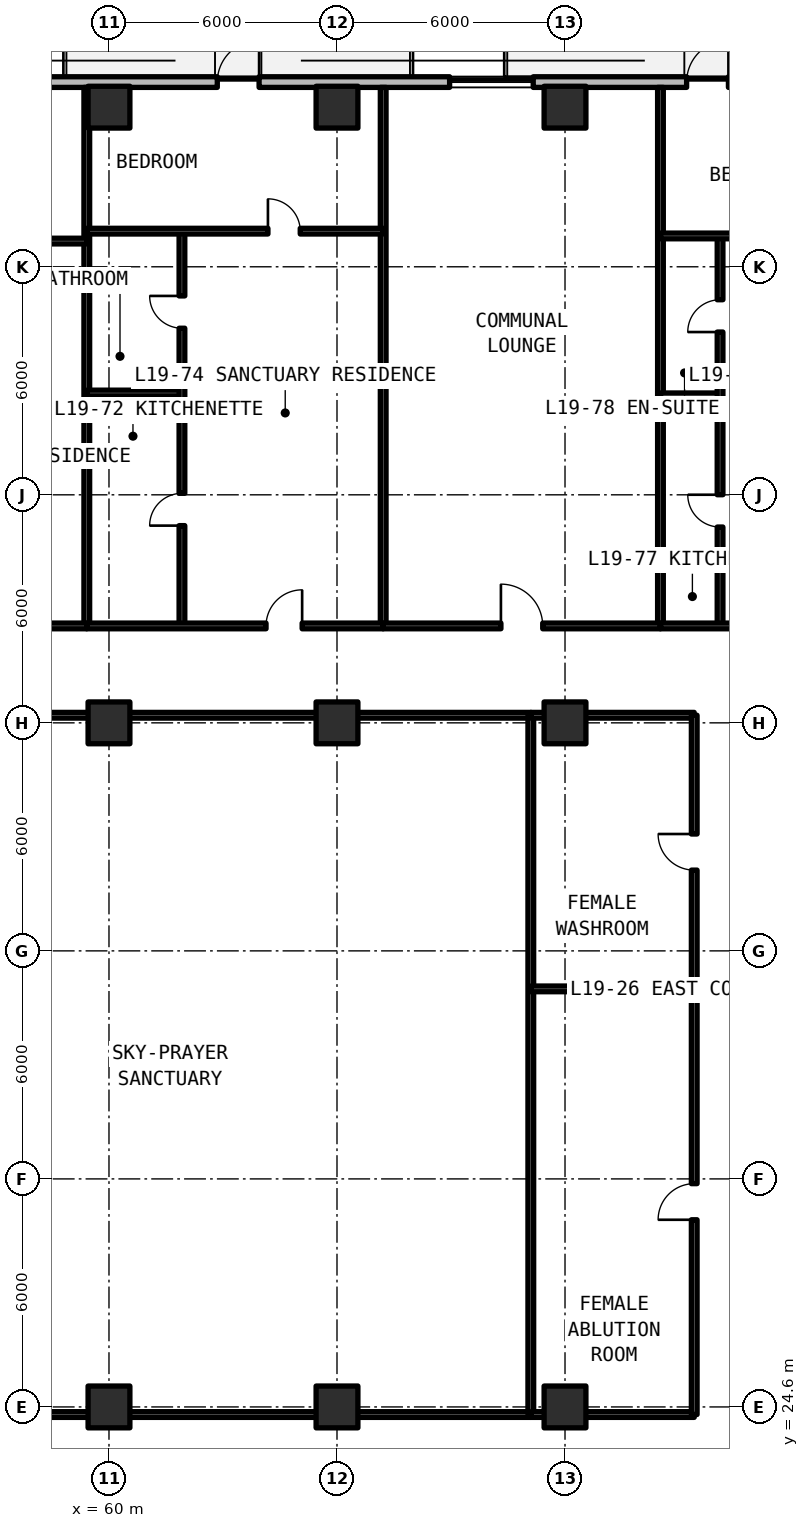
"""IFC4 building model, lengths in metres.
Left out: names, types, materials, properties, quantities, classifications, styles, units other than length and angle.
Written with IfcOpenShell. Run it as: python <this file> out.ifc"""

import sys

from ifc_helpers import new_model, si_unit, direction, frame, frame_2d, origin, origin_2d, place, context, subcontext, project, spatial, rectangle, extrude, element, fill, save


model = new_model("IFC4")
c1 = context("Model", 3, precision=1e-05, world=origin(), true_north=direction((0.0, 1.0)))
c2 = subcontext(c1, "Body", "Model", "MODEL_VIEW")
j1 = project(units=[si_unit("LENGTHUNIT", "METRE"), si_unit("PLANEANGLEUNIT", "RADIAN")], contexts=[c1])
p1 = place(None, origin())
s1 = spatial("IfcSite", under=j1, at=p1, CompositionType="ELEMENT")
p2 = place(p1, origin())
s2 = spatial("IfcBuilding", under=s1, at=p2, CompositionType="ELEMENT")
p3 = place(p2, frame((0.0, 0.0, 69.63)))
s3 = spatial("IfcBuildingStorey", under=s2, at=p3, CompositionType="ELEMENT", Elevation=69.63)
for number, where, z_axis, x_axis in (
    (1, (60.0, 24.6, 0.0), (0.0, 0.0, 1.0), (1.0, 0.0, 0.0)),
    (2, (60.0, 42.6, 0.0), (0.0, 0.0, 1.0), (1.0, 0.0, 0.0)),
    (3, (66.0, 24.6, 0.0), (0.0, 0.0, 1.0), (1.0, 0.0, 0.0)),
    (4, (66.0, 42.6, 0.0), (0.0, 0.0, 1.0), (1.0, 0.0, 0.0)),
    (5, (72.0, 24.6, 0.0), (0.0, 0.0, 1.0), (1.0, 0.0, 0.0)),
    (6, (72.0, 42.6, 0.0), (0.0, 0.0, 1.0), (1.0, 0.0, 0.0)),
    (7, (60.0, 58.8, 0.0), (0.0, 0.0, 1.0), (1.0, 0.0, 0.0)),
    (8, (66.0, 58.8, 0.0), (0.0, 0.0, 1.0), (1.0, 0.0, 0.0)),
    (9, (72.0, 58.8, 0.0), (0.0, 0.0, 1.0), (1.0, 0.0, 0.0)),
):
    element("IfcColumn", number, at=place(p3, frame(where, z_axis=z_axis, x_axis=x_axis)), inside=s3, PredefinedType="COLUMN", context=c2, shape_type="SweptSolid", body=[
        extrude(rectangle(XDim=1.1, YDim=1.1, at=origin_2d()), origin(), (0.0, 0.0, 1.0), 3.63),
    ])
p4 = place(p3, frame((96.542, 59.46, 0.0), z_axis=(0.0, 0.0, 1.0), x_axis=(-1.0, 0.0, 0.0)))
e10 = element("IfcWall", 10, at=p4, inside=s3, PredefinedType="SOLIDWALL", context=c2, shape_type="SweptSolid", body=[
    extrude(rectangle(XDim=44.402, YDim=0.28, at=frame_2d((22.201, 0.0))), origin(), (0.0, 0.0, 1.0), 3.35),
])
p5 = place(p4, frame((32.592, 0.0, 0.0)))
e11 = element("IfcOpeningElement", 11, at=p5, cuts=e10, PredefinedType="OPENING", context=c2, shape_type="SweptSolid", body=[
    extrude(rectangle(XDim=1.1, YDim=2.15, at=frame_2d((0.55, 1.075))), frame((0.0, 0.15, 0.0), z_axis=(0.0, -1.0, 0.0), x_axis=(1.0, 0.0, 0.0)), (0.0, 0.0, 1.0), 0.3),
])
p6 = place(p4, frame((20.242, 0.0, 0.0)))
e12 = element("IfcOpeningElement", 12, at=p6, cuts=e10, PredefinedType="OPENING", context=c2, shape_type="SweptSolid", body=[
    extrude(rectangle(XDim=1.1, YDim=2.15, at=frame_2d((0.55, 1.075))), frame((0.0, 0.15, 0.0), z_axis=(0.0, -1.0, 0.0), x_axis=(1.0, 0.0, 0.0)), (0.0, 0.0, 1.0), 0.3),
])
p7 = place(p4, frame((9.392, 0.0, 0.0)))
e13 = element("IfcOpeningElement", 13, at=p7, cuts=e10, PredefinedType="OPENING", context=c2, shape_type="SweptSolid", body=[
    extrude(rectangle(XDim=1.1, YDim=2.15, at=frame_2d((0.55, 1.075))), frame((0.0, 0.15, 0.0), z_axis=(0.0, -1.0, 0.0), x_axis=(1.0, 0.0, 0.0)), (0.0, 0.0, 1.0), 0.3),
])
p8 = place(p4, frame((39.514, 0.0, 0.78)))
e14 = element("IfcOpeningElement", 14, at=p8, cuts=e10, PredefinedType="OPENING", context=c2, shape_type="SweptSolid", body=[
    extrude(rectangle(XDim=2.2, YDim=1.66, at=frame_2d((1.1, 0.83))), frame((0.0, 0.15, 0.0), z_axis=(0.0, -1.0, 0.0), x_axis=(1.0, 0.0, 0.0)), (0.0, 0.0, 1.0), 0.3),
])
p9 = place(p4, frame((25.379, 0.0, 0.78)))
e15 = element("IfcOpeningElement", 15, at=p9, cuts=e10, PredefinedType="OPENING", context=c2, shape_type="SweptSolid", body=[
    extrude(rectangle(XDim=2.2, YDim=1.66, at=frame_2d((1.1, 0.83))), frame((0.0, 0.15, 0.0), z_axis=(0.0, -1.0, 0.0), x_axis=(1.0, 0.0, 0.0)), (0.0, 0.0, 1.0), 0.3),
])
p10 = place(p4, frame((2.564, 0.0, 0.78)))
e16 = element("IfcOpeningElement", 16, at=p10, cuts=e10, PredefinedType="OPENING", context=c2, shape_type="SweptSolid", body=[
    extrude(rectangle(XDim=2.2, YDim=1.66, at=frame_2d((1.1, 0.83))), frame((0.0, 0.15, 0.0), z_axis=(0.0, -1.0, 0.0), x_axis=(1.0, 0.0, 0.0)), (0.0, 0.0, 1.0), 0.3),
])
p11 = place(p3, frame((42.1, 24.4, 0.0), z_axis=(0.0, 0.0, 1.0), x_axis=(1.0, 0.0, 0.0)))
e17 = element("IfcWall", 17, at=p11, inside=s3, PredefinedType="SOLIDWALL", context=c2, shape_type="SweptSolid", body=[
    extrude(rectangle(XDim=29.0, YDim=0.15, at=frame_2d((14.5, 0.0))), origin(), (0.0, 0.0, 1.0), 2.565),
])
p12 = place(p11, frame((13.8, 0.0, 0.0)))
e18 = element("IfcOpeningElement", 18, at=p12, cuts=e17, PredefinedType="OPENING", context=c2, shape_type="SweptSolid", body=[
    extrude(rectangle(XDim=1.4, YDim=2.15, at=frame_2d((0.7, 1.075))), frame((0.0, 0.085, 0.0), z_axis=(0.0, -1.0, 0.0), x_axis=(1.0, 0.0, 0.0)), (0.0, 0.0, 1.0), 0.17),
])
p13 = place(p3, frame((42.1, 42.8, 0.0), z_axis=(0.0, 0.0, 1.0), x_axis=(1.0, 0.0, 0.0)))
e19 = element("IfcWall", 19, at=p13, inside=s3, PredefinedType="SOLIDWALL", context=c2, shape_type="SweptSolid", body=[
    extrude(rectangle(XDim=29.0, YDim=0.15, at=frame_2d((14.5, 0.0))), origin(), (0.0, 0.0, 1.0), 2.565),
])
p14 = place(p3, frame((71.1, 24.4, 0.0), z_axis=(0.0, 0.0, 1.0), x_axis=(0.0, 1.0, 0.0)))
e20 = element("IfcWall", 20, at=p14, inside=s3, PredefinedType="SOLIDWALL", context=c2, shape_type="SweptSolid", body=[
    extrude(rectangle(XDim=18.4, YDim=0.15, at=frame_2d((9.2, 0.0))), origin(), (0.0, 0.0, 1.0), 2.57),
])
p15 = place(p3, frame((71.1, 24.4, 0.0), z_axis=(0.0, 0.0, 1.0), x_axis=(1.0, 0.0, 0.0)))
e21 = element("IfcWall", 21, at=p15, inside=s3, PredefinedType="SOLIDWALL", context=c2, shape_type="SweptSolid", body=[
    extrude(rectangle(XDim=4.3, YDim=0.15, at=frame_2d((2.15, 0.0))), origin(), (0.0, 0.0, 1.0), 2.565),
])
p16 = place(p3, frame((71.1, 35.6, 0.0), z_axis=(0.0, 0.0, 1.0), x_axis=(1.0, 0.0, 0.0)))
e22 = element("IfcWall", 22, at=p16, inside=s3, PredefinedType="SOLIDWALL", context=c2, shape_type="SweptSolid", body=[
    extrude(rectangle(XDim=4.3, YDim=0.15, at=frame_2d((2.15, 0.0))), origin(), (0.0, 0.0, 1.0), 2.57),
])
p17 = place(p3, frame((75.4, 24.4, 0.0), z_axis=(0.0, 0.0, 1.0), x_axis=(0.0, 1.0, 0.0)))
e23 = element("IfcWall", 23, at=p17, inside=s3, PredefinedType="SOLIDWALL", context=c2, shape_type="SweptSolid", body=[
    extrude(rectangle(XDim=11.2, YDim=0.15, at=frame_2d((5.6, 0.0))), origin(), (0.0, 0.0, 1.0), 2.57),
])
p18 = place(p17, frame((5.125, 0.0, 0.0)))
e24 = element("IfcOpeningElement", 24, at=p18, cuts=e23, PredefinedType="OPENING", context=c2, shape_type="SweptSolid", body=[
    extrude(rectangle(XDim=0.95, YDim=2.15, at=frame_2d((0.475, 1.075))), frame((0.0, 0.085, 0.0), z_axis=(0.0, -1.0, 0.0), x_axis=(1.0, 0.0, 0.0)), (0.0, 0.0, 1.0), 0.17),
])
p19 = place(p3, frame((71.1, 42.8, 0.0), z_axis=(0.0, 0.0, 1.0), x_axis=(1.0, 0.0, 0.0)))
e25 = element("IfcWall", 25, at=p19, inside=s3, PredefinedType="SOLIDWALL", context=c2, shape_type="SweptSolid", body=[
    extrude(rectangle(XDim=4.3, YDim=0.15, at=frame_2d((2.15, 0.0))), origin(), (0.0, 0.0, 1.0), 2.565),
])
p20 = place(p3, frame((75.4, 35.6, 0.0), z_axis=(0.0, 0.0, 1.0), x_axis=(0.0, 1.0, 0.0)))
e26 = element("IfcWall", 26, at=p20, inside=s3, PredefinedType="SOLIDWALL", context=c2, shape_type="SweptSolid", body=[
    extrude(rectangle(XDim=7.2, YDim=0.15, at=frame_2d((3.6, 0.0))), origin(), (0.0, 0.0, 1.0), 2.57),
])
p21 = place(p20, frame((3.125, 0.0, 0.0)))
e27 = element("IfcOpeningElement", 27, at=p21, cuts=e26, PredefinedType="OPENING", context=c2, shape_type="SweptSolid", body=[
    extrude(rectangle(XDim=0.95, YDim=2.15, at=frame_2d((0.475, 1.075))), frame((0.0, 0.085, 0.0), z_axis=(0.0, -1.0, 0.0), x_axis=(1.0, 0.0, 0.0)), (0.0, 0.0, 1.0), 0.17),
])
p22 = place(p3, frame((59.416, 45.15, 0.0), z_axis=(0.0, 0.0, 1.0), x_axis=(0.0, 1.0, 0.0)))
e28 = element("IfcWall", 28, at=p22, inside=s3, PredefinedType="SOLIDWALL", context=c2, shape_type="SweptSolid", body=[
    extrude(rectangle(XDim=14.17, YDim=0.15, at=frame_2d((7.085, 0.0))), origin(), (0.0, 0.0, 1.0), 2.57),
])
p23 = place(p3, frame((52.12, 55.277, 0.0), z_axis=(0.0, 0.0, 1.0), x_axis=(1.0, 0.0, 0.0)))
e29 = element("IfcWall", 29, at=p23, inside=s3, PredefinedType="PARTITIONING", context=c2, shape_type="SweptSolid", body=[
    extrude(rectangle(XDim=7.296, YDim=0.15, at=frame_2d((3.648, 0.0))), origin(), (0.0, 0.0, 1.0), 2.57),
])
p24 = place(p23, frame((5.163, 0.0, 0.0)))
e30 = element("IfcOpeningElement", 30, at=p24, cuts=e29, PredefinedType="OPENING", context=c2, shape_type="SweptSolid", body=[
    extrude(rectangle(XDim=0.85, YDim=2.1, at=frame_2d((0.425, 1.05))), frame((0.0, 0.085, 0.0), z_axis=(0.0, -1.0, 0.0), x_axis=(1.0, 0.0, 0.0)), (0.0, 0.0, 1.0), 0.17),
])
p25 = place(p3, frame((52.12, 45.15, 0.0), z_axis=(0.0, 0.0, 1.0), x_axis=(1.0, 0.0, 0.0)))
e31 = element("IfcWall", 31, at=p25, inside=s3, PredefinedType="SOLIDWALL", context=c2, shape_type="SweptSolid", body=[
    extrude(rectangle(XDim=7.296, YDim=0.15, at=frame_2d((3.648, 0.0))), origin(), (0.0, 0.0, 1.0), 2.57),
])
p26 = place(p25, frame((5.113, 0.0, 0.0)))
e32 = element("IfcOpeningElement", 32, at=p26, cuts=e31, PredefinedType="OPENING", context=c2, shape_type="SweptSolid", body=[
    extrude(rectangle(XDim=0.95, YDim=2.15, at=frame_2d((0.475, 1.075))), frame((0.0, 0.085, 0.0), z_axis=(0.0, -1.0, 0.0), x_axis=(1.0, 0.0, 0.0)), (0.0, 0.0, 1.0), 0.17),
])
p27 = place(p3, frame((67.215, 45.15, 0.0), z_axis=(0.0, 0.0, 1.0), x_axis=(0.0, 1.0, 0.0)))
e33 = element("IfcWall", 33, at=p27, inside=s3, PredefinedType="SOLIDWALL", context=c2, shape_type="SweptSolid", body=[
    extrude(rectangle(XDim=14.17, YDim=0.15, at=frame_2d((7.085, 0.0))), origin(), (0.0, 0.0, 1.0), 2.57),
])
p28 = place(p3, frame((59.416, 51.279, 0.0), z_axis=(0.0, 0.0, 1.0), x_axis=(1.0, 0.0, 0.0)))
e34 = element("IfcWall", 34, at=p28, inside=s3, PredefinedType="PARTITIONING", context=c2, shape_type="SweptSolid", body=[
    extrude(rectangle(XDim=2.504, YDim=0.15, at=frame_2d((1.252, 0.0))), origin(), (0.0, 0.0, 1.0), 2.57),
])
p29 = place(p3, frame((61.92, 45.15, 0.0), z_axis=(0.0, 0.0, 1.0), x_axis=(0.0, 1.0, 0.0)))
e35 = element("IfcWall", 35, at=p29, inside=s3, PredefinedType="PARTITIONING", context=c2, shape_type="SweptSolid", body=[
    extrude(rectangle(XDim=10.388, YDim=0.15, at=frame_2d((5.194, 0.0))), origin(), (0.0, 0.0, 1.0), 2.57),
])
p30 = place(p29, frame((2.639, 0.0, 0.0)))
e36 = element("IfcOpeningElement", 36, at=p30, cuts=e35, PredefinedType="OPENING", context=c2, shape_type="SweptSolid", body=[
    extrude(rectangle(XDim=0.85, YDim=2.1, at=frame_2d((0.425, 1.05))), frame((0.0, 0.085, 0.0), z_axis=(0.0, -1.0, 0.0), x_axis=(1.0, 0.0, 0.0)), (0.0, 0.0, 1.0), 0.17),
])
p31 = place(p29, frame((7.833, 0.0, 0.0)))
e37 = element("IfcOpeningElement", 37, at=p31, cuts=e35, PredefinedType="OPENING", context=c2, shape_type="SweptSolid", body=[
    extrude(rectangle(XDim=0.85, YDim=2.1, at=frame_2d((0.425, 1.05))), frame((0.0, 0.085, 0.0), z_axis=(0.0, -1.0, 0.0), x_axis=(1.0, 0.0, 0.0)), (0.0, 0.0, 1.0), 0.17),
])
p32 = place(p3, frame((59.416, 55.538, 0.0), z_axis=(0.0, 0.0, 1.0), x_axis=(1.0, 0.0, 0.0)))
e38 = element("IfcWall", 38, at=p32, inside=s3, PredefinedType="PARTITIONING", context=c2, shape_type="SweptSolid", body=[
    extrude(rectangle(XDim=7.799, YDim=0.15, at=frame_2d((3.9, 0.0))), origin(), (0.0, 0.0, 1.0), 2.57),
])
p33 = place(p32, frame((4.767, 0.0, 0.0)))
e39 = element("IfcOpeningElement", 39, at=p33, cuts=e38, PredefinedType="OPENING", context=c2, shape_type="SweptSolid", body=[
    extrude(rectangle(XDim=0.85, YDim=2.1, at=frame_2d((0.425, 1.05))), frame((0.0, 0.085, 0.0), z_axis=(0.0, -1.0, 0.0), x_axis=(1.0, 0.0, 0.0)), (0.0, 0.0, 1.0), 0.17),
])
p34 = place(p3, frame((59.416, 45.15, 0.0), z_axis=(0.0, 0.0, 1.0), x_axis=(1.0, 0.0, 0.0)))
e40 = element("IfcWall", 40, at=p34, inside=s3, PredefinedType="SOLIDWALL", context=c2, shape_type="SweptSolid", body=[
    extrude(rectangle(XDim=7.799, YDim=0.15, at=frame_2d((3.9, 0.0))), origin(), (0.0, 0.0, 1.0), 2.57),
])
p35 = place(p34, frame((4.717, 0.0, 0.0)))
e41 = element("IfcOpeningElement", 41, at=p35, cuts=e40, PredefinedType="OPENING", context=c2, shape_type="SweptSolid", body=[
    extrude(rectangle(XDim=0.95, YDim=2.15, at=frame_2d((0.475, 1.075))), frame((0.0, 0.085, 0.0), z_axis=(0.0, -1.0, 0.0), x_axis=(1.0, 0.0, 0.0)), (0.0, 0.0, 1.0), 0.17),
])
p36 = place(p3, frame((74.511, 45.15, 0.0), z_axis=(0.0, 0.0, 1.0), x_axis=(0.0, 1.0, 0.0)))
e42 = element("IfcWall", 42, at=p36, inside=s3, PredefinedType="SOLIDWALL", context=c2, shape_type="SweptSolid", body=[
    extrude(rectangle(XDim=14.17, YDim=0.15, at=frame_2d((7.085, 0.0))), origin(), (0.0, 0.0, 1.0), 2.57),
])
p37 = place(p3, frame((67.215, 45.15, 0.0), z_axis=(0.0, 0.0, 1.0), x_axis=(1.0, 0.0, 0.0)))
e43 = element("IfcWall", 43, at=p37, inside=s3, PredefinedType="SOLIDWALL", context=c2, shape_type="SweptSolid", body=[
    extrude(rectangle(XDim=7.296, YDim=0.15, at=frame_2d((3.648, 0.0))), origin(), (0.0, 0.0, 1.0), 2.57),
])
p38 = place(p37, frame((3.098, 0.0, 0.0)))
e44 = element("IfcOpeningElement", 44, at=p38, cuts=e43, PredefinedType="OPENING", context=c2, shape_type="SweptSolid", body=[
    extrude(rectangle(XDim=1.1, YDim=2.15, at=frame_2d((0.55, 1.075))), frame((0.0, 0.085, 0.0), z_axis=(0.0, -1.0, 0.0), x_axis=(1.0, 0.0, 0.0)), (0.0, 0.0, 1.0), 0.17),
])
p39 = place(p3, frame((74.511, 51.204, 0.0), z_axis=(0.0, 0.0, 1.0), x_axis=(1.0, 0.0, 0.0)))
e45 = element("IfcWall", 45, at=p39, inside=s3, PredefinedType="PARTITIONING", context=c2, shape_type="SweptSolid", body=[
    extrude(rectangle(XDim=1.569, YDim=0.15, at=frame_2d((0.784, 0.0))), origin(), (0.0, 0.0, 1.0), 2.57),
])
p40 = place(p3, frame((76.08, 45.15, 0.0), z_axis=(0.0, 0.0, 1.0), x_axis=(0.0, 1.0, 0.0)))
e46 = element("IfcWall", 46, at=p40, inside=s3, PredefinedType="PARTITIONING", context=c2, shape_type="SweptSolid", body=[
    extrude(rectangle(XDim=10.262, YDim=0.15, at=frame_2d((5.131, 0.0))), origin(), (0.0, 0.0, 1.0), 2.57),
])
p41 = place(p40, frame((2.602, 0.0, 0.0)))
e47 = element("IfcOpeningElement", 47, at=p41, cuts=e46, PredefinedType="OPENING", context=c2, shape_type="SweptSolid", body=[
    extrude(rectangle(XDim=0.85, YDim=2.1, at=frame_2d((0.425, 1.05))), frame((0.0, 0.085, 0.0), z_axis=(0.0, -1.0, 0.0), x_axis=(1.0, 0.0, 0.0)), (0.0, 0.0, 1.0), 0.17),
])
p42 = place(p40, frame((7.733, 0.0, 0.0)))
e48 = element("IfcOpeningElement", 48, at=p42, cuts=e46, PredefinedType="OPENING", context=c2, shape_type="SweptSolid", body=[
    extrude(rectangle(XDim=0.85, YDim=2.1, at=frame_2d((0.425, 1.05))), frame((0.0, 0.085, 0.0), z_axis=(0.0, -1.0, 0.0), x_axis=(1.0, 0.0, 0.0)), (0.0, 0.0, 1.0), 0.17),
])
p43 = place(p3, frame((74.511, 55.412, 0.0), z_axis=(0.0, 0.0, 1.0), x_axis=(1.0, 0.0, 0.0)))
e49 = element("IfcWall", 49, at=p43, inside=s3, PredefinedType="PARTITIONING", context=c2, shape_type="SweptSolid", body=[
    extrude(rectangle(XDim=7.548, YDim=0.15, at=frame_2d((3.774, 0.0))), origin(), (0.0, 0.0, 1.0), 2.57),
])
p44 = place(p43, frame((4.173, 0.0, 0.0)))
e50 = element("IfcOpeningElement", 50, at=p44, cuts=e49, PredefinedType="OPENING", context=c2, shape_type="SweptSolid", body=[
    extrude(rectangle(XDim=0.85, YDim=2.1, at=frame_2d((0.425, 1.05))), frame((0.0, 0.085, 0.0), z_axis=(0.0, -1.0, 0.0), x_axis=(1.0, 0.0, 0.0)), (0.0, 0.0, 1.0), 0.17),
])
p45 = place(p3, frame((74.511, 45.15, 0.0), z_axis=(0.0, 0.0, 1.0), x_axis=(1.0, 0.0, 0.0)))
e51 = element("IfcWall", 51, at=p45, inside=s3, PredefinedType="SOLIDWALL", context=c2, shape_type="SweptSolid", body=[
    extrude(rectangle(XDim=7.548, YDim=0.15, at=frame_2d((3.774, 0.0))), origin(), (0.0, 0.0, 1.0), 2.57),
])
p46 = place(p45, frame((4.123, 0.0, 0.0)))
e52 = element("IfcOpeningElement", 52, at=p46, cuts=e51, PredefinedType="OPENING", context=c2, shape_type="SweptSolid", body=[
    extrude(rectangle(XDim=0.95, YDim=2.15, at=frame_2d((0.475, 1.075))), frame((0.0, 0.085, 0.0), z_axis=(0.0, -1.0, 0.0), x_axis=(1.0, 0.0, 0.0)), (0.0, 0.0, 1.0), 0.17),
])
p47 = place(p5, frame((1.1, 0.0, 0.0), z_axis=(0.0, 0.0, 1.0), x_axis=(-1.0, 0.0, 0.0)))
e53 = element("IfcDoor", 53, at=p47, inside=s3, OperationType="SINGLE_SWING_RIGHT", PredefinedType="DOOR", context=c2, shape_type="SweptSolid", body=[
    extrude(rectangle(XDim=1.1, YDim=2.15, at=frame_2d((0.55, 1.075))), frame((0.0, 0.025, 0.0), z_axis=(0.0, -1.0, 0.0), x_axis=(1.0, 0.0, 0.0)), (0.0, 0.0, 1.0), 0.05),
])
fill(e11, e53)
p48 = place(p6, frame((1.1, 0.0, 0.0), z_axis=(0.0, 0.0, 1.0), x_axis=(-1.0, 0.0, 0.0)))
e54 = element("IfcDoor", 54, at=p48, inside=s3, OperationType="SINGLE_SWING_LEFT", PredefinedType="DOOR", context=c2, shape_type="SweptSolid", body=[
    extrude(rectangle(XDim=1.1, YDim=2.15, at=frame_2d((0.55, 1.075))), frame((0.0, 0.025, 0.0), z_axis=(0.0, -1.0, 0.0), x_axis=(1.0, 0.0, 0.0)), (0.0, 0.0, 1.0), 0.05),
])
fill(e12, e54)
p49 = place(p9, origin())
e55 = element("IfcWindow", 55, at=p49, inside=s3, PartitioningType="SINGLE_PANEL", PredefinedType="WINDOW", context=c2, shape_type="SweptSolid", body=[
    extrude(rectangle(XDim=2.2, YDim=1.66, at=frame_2d((1.1, 0.83))), frame((0.0, 0.03, 0.0), z_axis=(0.0, -1.0, 0.0), x_axis=(1.0, 0.0, 0.0)), (0.0, 0.0, 1.0), 0.06),
])
fill(e15, e55)
p50 = place(p18, origin())
e56 = element("IfcDoor", 56, at=p50, inside=s3, OperationType="SINGLE_SWING_LEFT", PredefinedType="DOOR", context=c2, shape_type="SweptSolid", body=[
    extrude(rectangle(XDim=0.95, YDim=2.15, at=frame_2d((0.475, 1.075))), frame((0.0, 0.025, 0.0), z_axis=(0.0, -1.0, 0.0), x_axis=(1.0, 0.0, 0.0)), (0.0, 0.0, 1.0), 0.05),
])
fill(e24, e56)
p51 = place(p21, origin())
e57 = element("IfcDoor", 57, at=p51, inside=s3, OperationType="SINGLE_SWING_RIGHT", PredefinedType="DOOR", context=c2, shape_type="SweptSolid", body=[
    extrude(rectangle(XDim=0.95, YDim=2.15, at=frame_2d((0.475, 1.075))), frame((0.0, 0.025, 0.0), z_axis=(0.0, -1.0, 0.0), x_axis=(1.0, 0.0, 0.0)), (0.0, 0.0, 1.0), 0.05),
])
fill(e27, e57)
p52 = place(p30, origin())
e58 = element("IfcDoor", 58, at=p52, inside=s3, OperationType="SINGLE_SWING_LEFT", PredefinedType="DOOR", context=c2, shape_type="SweptSolid", body=[
    extrude(rectangle(XDim=0.85, YDim=2.1, at=frame_2d((0.425, 1.05))), frame((0.0, 0.025, 0.0), z_axis=(0.0, -1.0, 0.0), x_axis=(1.0, 0.0, 0.0)), (0.0, 0.0, 1.0), 0.05),
])
fill(e36, e58)
p53 = place(p31, origin())
e59 = element("IfcDoor", 59, at=p53, inside=s3, OperationType="SINGLE_SWING_RIGHT", PredefinedType="DOOR", context=c2, shape_type="SweptSolid", body=[
    extrude(rectangle(XDim=0.85, YDim=2.1, at=frame_2d((0.425, 1.05))), frame((0.0, 0.025, 0.0), z_axis=(0.0, -1.0, 0.0), x_axis=(1.0, 0.0, 0.0)), (0.0, 0.0, 1.0), 0.05),
])
fill(e37, e59)
p54 = place(p33, origin())
e60 = element("IfcDoor", 60, at=p54, inside=s3, OperationType="SINGLE_SWING_LEFT", PredefinedType="DOOR", context=c2, shape_type="SweptSolid", body=[
    extrude(rectangle(XDim=0.85, YDim=2.1, at=frame_2d((0.425, 1.05))), frame((0.0, 0.025, 0.0), z_axis=(0.0, -1.0, 0.0), x_axis=(1.0, 0.0, 0.0)), (0.0, 0.0, 1.0), 0.05),
])
fill(e39, e60)
p55 = place(p35, origin())
e61 = element("IfcDoor", 61, at=p55, inside=s3, OperationType="SINGLE_SWING_RIGHT", PredefinedType="DOOR", context=c2, shape_type="SweptSolid", body=[
    extrude(rectangle(XDim=0.95, YDim=2.15, at=frame_2d((0.475, 1.075))), frame((0.0, 0.025, 0.0), z_axis=(0.0, -1.0, 0.0), x_axis=(1.0, 0.0, 0.0)), (0.0, 0.0, 1.0), 0.05),
])
fill(e41, e61)
p56 = place(p38, origin())
e62 = element("IfcDoor", 62, at=p56, inside=s3, OperationType="SINGLE_SWING_LEFT", PredefinedType="DOOR", context=c2, shape_type="SweptSolid", body=[
    extrude(rectangle(XDim=1.1, YDim=2.15, at=frame_2d((0.55, 1.075))), frame((0.0, 0.025, 0.0), z_axis=(0.0, -1.0, 0.0), x_axis=(1.0, 0.0, 0.0)), (0.0, 0.0, 1.0), 0.05),
])
fill(e44, e62)
p57 = place(p41, origin())
e63 = element("IfcDoor", 63, at=p57, inside=s3, OperationType="SINGLE_SWING_RIGHT", PredefinedType="DOOR", context=c2, shape_type="SweptSolid", body=[
    extrude(rectangle(XDim=0.85, YDim=2.1, at=frame_2d((0.425, 1.05))), frame((0.0, 0.025, 0.0), z_axis=(0.0, -1.0, 0.0), x_axis=(1.0, 0.0, 0.0)), (0.0, 0.0, 1.0), 0.05),
])
fill(e47, e63)
p58 = place(p42, origin())
e64 = element("IfcDoor", 64, at=p58, inside=s3, OperationType="SINGLE_SWING_LEFT", PredefinedType="DOOR", context=c2, shape_type="SweptSolid", body=[
    extrude(rectangle(XDim=0.85, YDim=2.1, at=frame_2d((0.425, 1.05))), frame((0.0, 0.025, 0.0), z_axis=(0.0, -1.0, 0.0), x_axis=(1.0, 0.0, 0.0)), (0.0, 0.0, 1.0), 0.05),
])
fill(e48, e64)
save(model, sys.argv[1])
